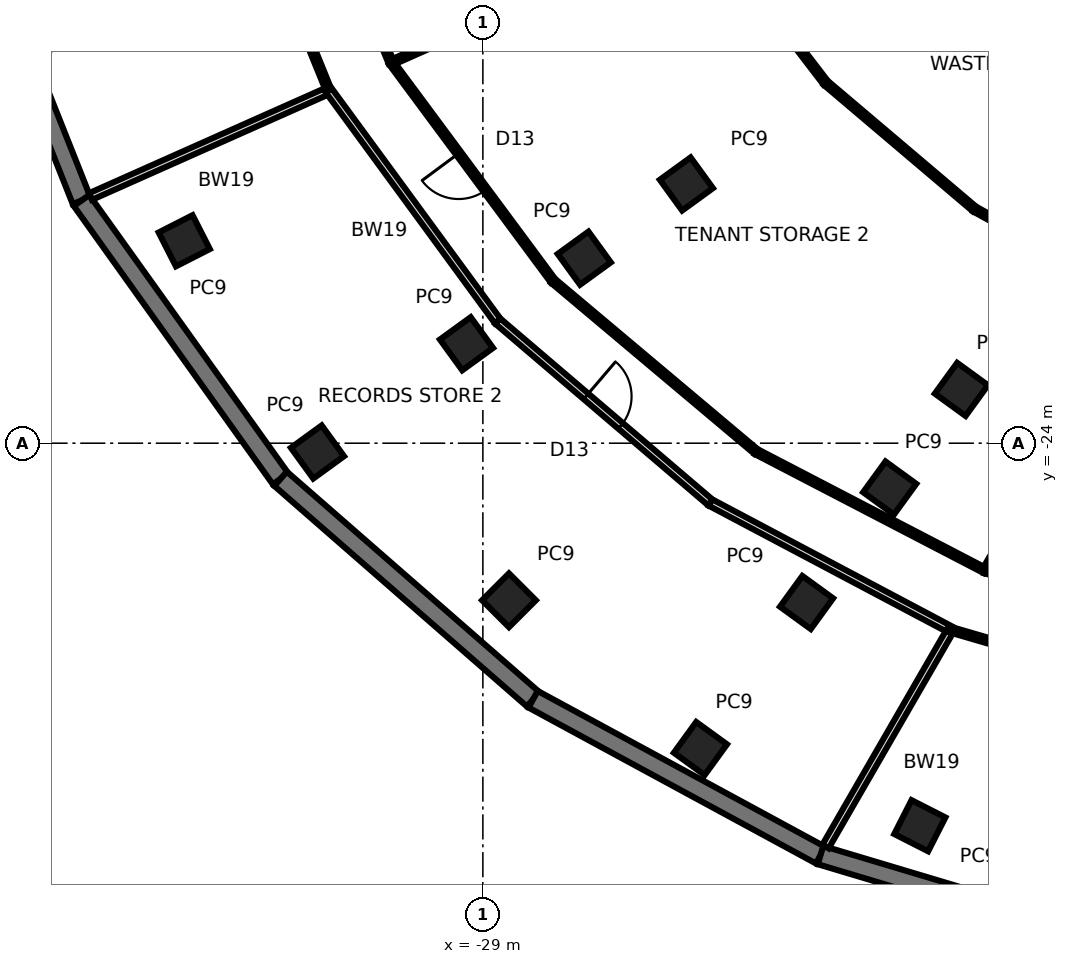
"""IFC4 building model, lengths in metres.
Left out: names, types, materials, properties, quantities, classifications, styles, units other than length and angle.
Written with IfcOpenShell. Run it as: python <this file> out.ifc"""

import sys

from ifc_helpers import new_model, si_unit, direction, frame, frame_2d, origin, origin_2d, place, context, subcontext, project, spatial, rectangle, extrude, element, fill, save


model = new_model("IFC4")
c1 = context("Model", 3, precision=1e-05, world=origin(), true_north=direction((0.0, 1.0)))
c2 = subcontext(c1, "Body", "Model", "MODEL_VIEW")
j1 = project(units=[si_unit("LENGTHUNIT", "METRE"), si_unit("PLANEANGLEUNIT", "RADIAN")], contexts=[c1])
p1 = place(None, origin())
s1 = spatial("IfcSite", under=j1, at=p1, CompositionType="ELEMENT")
p2 = place(p1, origin())
s2 = spatial("IfcBuilding", under=s1, at=p2, CompositionType="ELEMENT")
p3 = place(p2, frame((0.0, 0.0, -5.0)))
s3 = spatial("IfcBuildingStorey", under=s2, at=p3, CompositionType="ELEMENT", Elevation=-5.0)
p4 = place(p3, frame((-42.933, -9.126, -0.15), z_axis=(0.0, 0.0, 1.0), x_axis=(0.369269619769, -0.929322305724, 0.0)))
e1 = element("IfcWall", 1, at=p4, inside=s3, PredefinedType="SOLIDWALL", context=c2, shape_type="SweptSolid", body=[
    extrude(rectangle(XDim=9.133, YDim=0.5, at=frame_2d((4.566, 0.0))), origin(), (0.0, 0.0, 1.0), 4.95),
])
p5 = place(p3, frame((-39.56, -17.613, -0.15), z_axis=(0.0, 0.0, 1.0), x_axis=(0.581684414847, -0.813414556991, 0.0)))
e2 = element("IfcWall", 2, at=p5, inside=s3, PredefinedType="SOLIDWALL", context=c2, shape_type="SweptSolid", body=[
    extrude(rectangle(XDim=9.004, YDim=0.5, at=frame_2d((4.502, 0.0))), origin(), (0.0, 0.0, 1.0), 4.95),
])
p6 = place(p3, frame((-34.323, -24.937, -0.15), z_axis=(0.0, 0.0, 1.0), x_axis=(0.753323689885, -0.657649920747, 0.0)))
e3 = element("IfcWall", 3, at=p6, inside=s3, PredefinedType="SOLIDWALL", context=c2, shape_type="SweptSolid", body=[
    extrude(rectangle(XDim=8.822, YDim=0.5, at=frame_2d((4.411, 0.0))), origin(), (0.0, 0.0, 1.0), 4.95),
])
p7 = place(p3, frame((-27.677, -30.739, -0.15), z_axis=(0.0, 0.0, 1.0), x_axis=(0.879050198661, -0.476729218986, 0.0)))
e4 = element("IfcWall", 4, at=p7, inside=s3, PredefinedType="SOLIDWALL", context=c2, shape_type="SweptSolid", body=[
    extrude(rectangle(XDim=8.603, YDim=0.5, at=frame_2d((4.302, 0.0))), origin(), (0.0, 0.0, 1.0), 4.95),
])
p8 = place(p3, frame((-20.115, -34.84, -0.15), z_axis=(0.0, 0.0, 1.0), x_axis=(0.958018826272, -0.286705299059, 0.0)))
e5 = element("IfcWall", 5, at=p8, inside=s3, PredefinedType="SOLIDWALL", context=c2, shape_type="SweptSolid", body=[
    extrude(rectangle(XDim=8.366, YDim=0.5, at=frame_2d((4.183, 0.0))), origin(), (0.0, 0.0, 1.0), 4.95),
])
for number, where, z_axis, x_axis in (
    (6, (-40.363, -13.115, -0.15), (0.0, 0.0, 1.0), (-0.951, -0.309, 0.0)),
    (7, (-36.858, -18.673, -0.15), (0.0, 0.0, 1.0), (-0.891, -0.454, 0.0)),
    (8, (-33.352, -24.232, -0.15), (0.0, 0.0, 1.0), (-0.809, -0.588, 0.0)),
    (9, (-28.313, -28.133, -0.15), (0.0, 0.0, 1.0), (-0.707, -0.707, 0.0)),
    (10, (-23.275, -32.035, -0.15), (0.0, 0.0, 1.0), (-0.588, -0.809, 0.0)),
    (11, (-17.502, -34.066, -0.15), (0.0, 0.0, 1.0), (-0.454, -0.891, 0.0)),
    (12, (-29.431, -21.383, -0.15), (0.0, 0.0, 1.0), (-0.809, -0.588, 0.0)),
    (13, (-20.483, -28.192, -0.15), (0.0, 0.0, 1.0), (-0.588, -0.809, 0.0)),
    (14, (-26.332, -19.131, -0.15), (0.0, 0.0, 1.0), (-0.809, -0.588, 0.0)),
    (15, (-18.294, -25.18, -0.15), (0.0, 0.0, 1.0), (-0.588, -0.809, 0.0)),
    (16, (-23.645, -17.179, -0.15), (0.0, 0.0, 1.0), (-0.809, -0.588, 0.0)),
    (17, (-16.409, -22.584, -0.15), (0.0, 0.0, 1.0), (-0.588, -0.809, 0.0)),
):
    element("IfcColumn", number, at=place(p3, frame(where, z_axis=z_axis, x_axis=x_axis)), inside=s3, PredefinedType="COLUMN", context=c2, shape_type="SweptSolid", body=[
        extrude(rectangle(XDim=1.0, YDim=1.0, at=origin_2d()), origin(), (0.0, 0.0, 1.0), 5.15),
    ])
p9 = place(p3, frame((-31.41, -13.985, 0.0), z_axis=(0.0, 0.0, 1.0), x_axis=(-0.380714323158, 0.924692707954, 0.0)))
e18 = element("IfcWall", 18, at=p9, inside=s3, PredefinedType="PARTITIONING", context=c2, shape_type="SweptSolid", body=[
    extrude(rectangle(XDim=7.268, YDim=0.15, at=frame_2d((3.634, 0.0))), origin(), (0.0, 0.0, 1.0), 4.8),
])
p10 = place(p3, frame((-35.938, -7.639, 0.0), z_axis=(0.0, 0.0, 1.0), x_axis=(0.377265431085, -0.926105174647, 0.0)))
e19 = element("IfcWall", 19, at=p10, inside=s3, PredefinedType="PARTITIONING", context=c2, shape_type="SweptSolid", body=[
    extrude(rectangle(XDim=7.643, YDim=0.15, at=frame_2d((3.821, 0.0))), origin(), (0.0, 0.0, 1.0), 4.8),
])
p11 = place(p3, frame((-33.054, -14.717, 0.0), z_axis=(0.0, 0.0, 1.0), x_axis=(-0.913544372022, -0.40673908141, 0.0)))
e20 = element("IfcWall", 20, at=p11, inside=s3, PredefinedType="SOLIDWALL", context=c2, shape_type="SweptSolid", body=[
    extrude(rectangle(XDim=6.863, YDim=0.19, at=frame_2d((3.432, 0.0))), origin(), (0.0, 0.0, 1.0), 4.8),
])
p12 = place(p3, frame((-16.0, -7.124, 0.0), z_axis=(0.0, 0.0, 1.0), x_axis=(-0.913549946031, -0.40672656184, 0.0)))
e21 = element("IfcWall", 21, at=p12, inside=s3, PredefinedType="PARTITIONING", context=c2, shape_type="SweptSolid", body=[
    extrude(rectangle(XDim=16.868, YDim=0.15, at=frame_2d((8.434, 0.0))), origin(), (0.0, 0.0, 1.0), 4.8),
])
p13 = place(p3, frame((-19.98, -14.516, 0.0), z_axis=(0.0, 0.0, 1.0), x_axis=(-0.608481047622, 0.793568405801, 0.0)))
e22 = element("IfcWall", 22, at=p13, inside=s3, PredefinedType="PARTITIONING", context=c2, shape_type="SweptSolid", body=[
    extrude(rectangle(XDim=5.28, YDim=0.15, at=frame_2d((2.64, 0.0))), origin(), (0.0, 0.0, 1.0), 4.8),
])
p14 = place(p3, frame((-27.153, -19.728, 0.0), z_axis=(0.0, 0.0, 1.0), x_axis=(-0.595449673077, 0.803392610641, 0.0)))
e23 = element("IfcWall", 23, at=p14, inside=s3, PredefinedType="PARTITIONING", context=c2, shape_type="SweptSolid", body=[
    extrude(rectangle(XDim=7.149, YDim=0.15, at=frame_2d((3.574, 0.0))), origin(), (0.0, 0.0, 1.0), 4.8),
])
p15 = place(p14, frame((2.974, 0.0, 0.0)))
e24 = element("IfcOpeningElement", 24, at=p15, cuts=e23, PredefinedType="OPENING", context=c2, shape_type="SweptSolid", body=[
    extrude(rectangle(XDim=1.2, YDim=2.4, at=frame_2d((0.6, 1.2))), frame((0.0, 0.085, 0.0), z_axis=(0.0, -1.0, 0.0), x_axis=(1.0, 0.0, 0.0)), (0.0, 0.0, 1.0), 0.17),
])
p16 = place(p3, frame((-33.054, -14.717, 0.0), z_axis=(0.0, 0.0, 1.0), x_axis=(0.590858446285, -0.806775245315, 0.0)))
e25 = element("IfcWall", 25, at=p16, inside=s3, PredefinedType="SOLIDWALL", context=c2, shape_type="SweptSolid", body=[
    extrude(rectangle(XDim=7.523, YDim=0.19, at=frame_2d((3.761, 0.0))), origin(), (0.0, 0.0, 1.0), 4.8),
])
p17 = place(p3, frame((-21.809, -24.222, 0.0), z_axis=(0.0, 0.0, 1.0), x_axis=(-0.765373437874, 0.643586435995, 0.0)))
e26 = element("IfcWall", 26, at=p17, inside=s3, PredefinedType="PARTITIONING", context=c2, shape_type="SweptSolid", body=[
    extrude(rectangle(XDim=6.982, YDim=0.15, at=frame_2d((3.491, 0.0))), origin(), (0.0, 0.0, 1.0), 4.8),
])
p18 = place(p3, frame((-16.062, -17.839, 0.0), z_axis=(0.0, 0.0, 1.0), x_axis=(-0.762708036384, 0.646742956077, 0.0)))
e27 = element("IfcWall", 27, at=p18, inside=s3, PredefinedType="PARTITIONING", context=c2, shape_type="SweptSolid", body=[
    extrude(rectangle(XDim=5.137, YDim=0.15, at=frame_2d((2.568, 0.0))), origin(), (0.0, 0.0, 1.0), 4.8),
])
p19 = place(p3, frame((-28.61, -20.786, 0.0), z_axis=(0.0, 0.0, 1.0), x_axis=(0.760805512378, -0.64897994756, 0.0)))
e28 = element("IfcWall", 28, at=p19, inside=s3, PredefinedType="SOLIDWALL", context=c2, shape_type="SweptSolid", body=[
    extrude(rectangle(XDim=7.355, YDim=0.19, at=frame_2d((3.678, 0.0))), origin(), (0.0, 0.0, 1.0), 4.8),
])
p20 = place(p19, frame((3.053, 0.0, 0.0)))
e29 = element("IfcOpeningElement", 29, at=p20, cuts=e28, PredefinedType="OPENING", context=c2, shape_type="SweptSolid", body=[
    extrude(rectangle(XDim=1.2, YDim=2.4, at=frame_2d((0.6, 1.2))), frame((0.0, 0.105, 0.0), z_axis=(0.0, -1.0, 0.0), x_axis=(1.0, 0.0, 0.0)), (0.0, 0.0, 1.0), 0.21),
])
p21 = place(p3, frame((-15.791, -27.35, 0.0), z_axis=(0.0, 0.0, 1.0), x_axis=(-0.887313425563, 0.461166873068, 0.0)))
e30 = element("IfcWall", 30, at=p21, inside=s3, PredefinedType="PARTITIONING", context=c2, shape_type="SweptSolid", body=[
    extrude(rectangle(XDim=6.783, YDim=0.15, at=frame_2d((3.392, 0.0))), origin(), (0.0, 0.0, 1.0), 4.8),
])
p22 = place(p3, frame((-23.014, -25.559, 0.0), z_axis=(0.0, 0.0, 1.0), x_axis=(0.883685814524, -0.468080528551, 0.0)))
e31 = element("IfcWall", 31, at=p22, inside=s3, PredefinedType="SOLIDWALL", context=c2, shape_type="SweptSolid", body=[
    extrude(rectangle(XDim=7.156, YDim=0.19, at=frame_2d((3.578, 0.0))), origin(), (0.0, 0.0, 1.0), 4.8),
])
p23 = place(p3, frame((-11.691, -20.25, 0.0), z_axis=(0.0, 0.0, 1.0), x_axis=(-0.875641162684, 0.482962269968, 0.0)))
e32 = element("IfcWall", 32, at=p23, inside=s3, PredefinedType="PARTITIONING", context=c2, shape_type="SweptSolid", body=[
    extrude(rectangle(XDim=4.992, YDim=0.15, at=frame_2d((2.496, 0.0))), origin(), (0.0, 0.0, 1.0), 4.8),
])
p24 = place(p3, frame((-16.69, -28.909, 0.0), z_axis=(0.0, 0.0, 1.0), x_axis=(-0.5000047107, -0.866022684043, 0.0)))
e33 = element("IfcWall", 33, at=p24, inside=s3, PredefinedType="SOLIDWALL", context=c2, shape_type="SweptSolid", body=[
    extrude(rectangle(XDim=6.589, YDim=0.19, at=frame_2d((3.294, 0.0))), origin(), (0.0, 0.0, 1.0), 4.8),
])
p25 = place(p3, frame((-6.524, -11.3, 0.0), z_axis=(0.0, 0.0, 1.0), x_axis=(-0.499999933838, -0.866025441983, 0.0)))
e34 = element("IfcWall", 34, at=p25, inside=s3, PredefinedType="PARTITIONING", context=c2, shape_type="SweptSolid", body=[
    extrude(rectangle(XDim=18.533, YDim=0.15, at=frame_2d((9.266, 0.0))), origin(), (0.0, 0.0, 1.0), 4.8),
])
p26 = place(p3, frame((-9.468, -29.139, 0.0), z_axis=(0.0, 0.0, 1.0), x_axis=(-0.962199616319, 0.272345182362, 0.0)))
e35 = element("IfcWall", 35, at=p26, inside=s3, PredefinedType="PARTITIONING", context=c2, shape_type="SweptSolid", body=[
    extrude(rectangle(XDim=6.571, YDim=0.15, at=frame_2d((3.285, 0.0))), origin(), (0.0, 0.0, 1.0), 4.8),
])
p27 = place(p3, frame((-16.69, -28.909, 0.0), z_axis=(0.0, 0.0, 1.0), x_axis=(0.960065738287, -0.279774513076, 0.0)))
e36 = element("IfcWall", 36, at=p27, inside=s3, PredefinedType="PARTITIONING", context=c2, shape_type="SweptSolid", body=[
    extrude(rectangle(XDim=6.944, YDim=0.15, at=frame_2d((3.472, 0.0))), origin(), (0.0, 0.0, 1.0), 4.8),
])
p28 = place(p27, frame((2.872, 0.0, 0.0)))
e37 = element("IfcOpeningElement", 37, at=p28, cuts=e36, PredefinedType="OPENING", context=c2, shape_type="SweptSolid", body=[
    extrude(rectangle(XDim=1.2, YDim=2.4, at=frame_2d((0.6, 1.2))), frame((0.0, 0.085, 0.0), z_axis=(0.0, -1.0, 0.0), x_axis=(1.0, 0.0, 0.0)), (0.0, 0.0, 1.0), 0.17),
])
p29 = place(p15, origin())
e38 = element("IfcDoor", 38, at=p29, inside=s3, OperationType="SINGLE_SWING_RIGHT", PredefinedType="DOOR", context=c2, shape_type="SweptSolid", body=[
    extrude(rectangle(XDim=1.2, YDim=2.4, at=frame_2d((0.6, 1.2))), frame((0.0, 0.025, 0.0), z_axis=(0.0, -1.0, 0.0), x_axis=(1.0, 0.0, 0.0)), (0.0, 0.0, 1.0), 0.05),
])
fill(e24, e38)
p30 = place(p20, origin())
e39 = element("IfcDoor", 39, at=p30, inside=s3, OperationType="SINGLE_SWING_LEFT", PredefinedType="DOOR", context=c2, shape_type="SweptSolid", body=[
    extrude(rectangle(XDim=1.2, YDim=2.4, at=frame_2d((0.6, 1.2))), frame((0.0, 0.025, 0.0), z_axis=(0.0, -1.0, 0.0), x_axis=(1.0, 0.0, 0.0)), (0.0, 0.0, 1.0), 0.05),
])
fill(e29, e39)
save(model, sys.argv[1])
